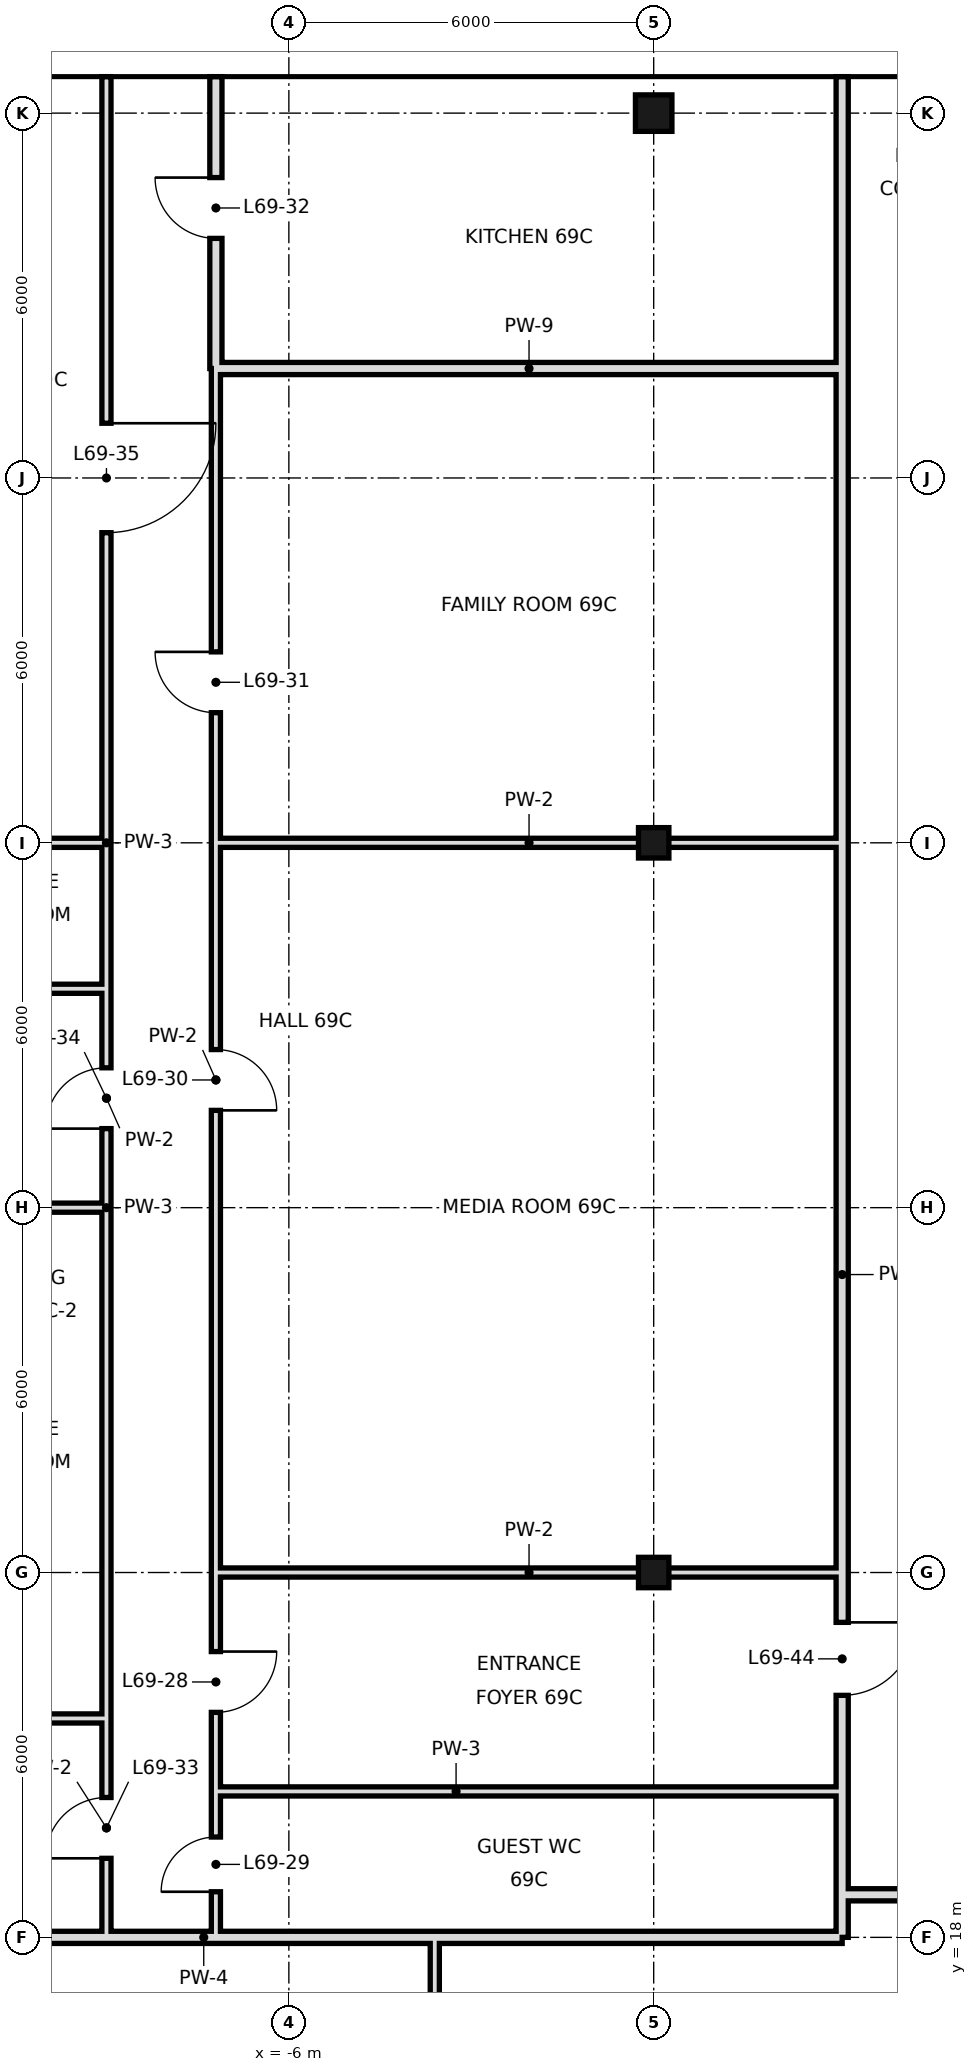
"""IFC4 building model, lengths in metres.
Left out: names, types, materials, properties, quantities, classifications, styles, units other than length and angle.
Written with IfcOpenShell. Run it as: python <this file> out.ifc"""

import sys

from ifc_helpers import new_model, si_unit, direction, frame, frame_2d, origin, origin_2d, place, context, subcontext, project, spatial, rectangle, hollow_rectangle, extrude, element, fill, save


model = new_model("IFC4")
c1 = context("Model", 3, precision=1e-05, world=origin(), true_north=direction((0.0, 1.0)))
c2 = subcontext(c1, "Body", "Model", "MODEL_VIEW")
j1 = project(units=[si_unit("LENGTHUNIT", "METRE"), si_unit("PLANEANGLEUNIT", "RADIAN")], contexts=[c1])
p1 = place(None, origin())
s1 = spatial("IfcSite", under=j1, at=p1, CompositionType="ELEMENT")
p2 = place(p1, origin())
s2 = spatial("IfcBuilding", under=s1, at=p2, CompositionType="ELEMENT")
p3 = place(p2, frame((0.0, 0.0, 294.4)))
s3 = spatial("IfcBuildingStorey", under=s2, at=p3, CompositionType="ELEMENT", Elevation=294.4)
for number, where, z_axis, x_axis in (
    (1, (0.0, 24.0, 0.0), (0.0, 0.0, 1.0), (1.0, 0.0, 0.0)),
    (2, (0.0, 36.0, 0.0), (0.0, 0.0, 1.0), (1.0, 0.0, 0.0)),
):
    element("IfcColumn", number, at=place(p3, frame(where, z_axis=z_axis, x_axis=x_axis)), inside=s3, PredefinedType="COLUMN", context=c2, shape_type="SweptSolid", body=[
        extrude(hollow_rectangle(XDim=0.5, YDim=0.5, WallThickness=0.025, at=origin_2d()), origin(), (0.0, 0.0, 1.0), 3.6),
    ])
p4 = place(p3, frame((0.0, 48.0, 0.0), z_axis=(0.0, 0.0, 1.0), x_axis=(1.0, 0.0, 0.0)))
e3 = element("IfcColumn", 3, at=p4, inside=s3, PredefinedType="COLUMN", context=c2, shape_type="SweptSolid", body=[
    extrude(hollow_rectangle(XDim=0.6, YDim=0.6, WallThickness=0.028, at=origin_2d()), origin(), (0.0, 0.0, 1.0), 3.6),
])
p5 = place(p3, frame((-3.6, 10.8, 0.0), z_axis=(0.0, 0.0, 1.0), x_axis=(0.0, 1.0, 0.0)))
e4 = element("IfcWall", 4, at=p5, inside=s3, PredefinedType="PARTITIONING", context=c2, shape_type="SweptSolid", body=[
    extrude(rectangle(XDim=7.2, YDim=0.15, at=frame_2d((3.6, 0.0))), origin(), (0.0, 0.0, 1.0), 3.42),
])
p6 = place(p3, frame((-7.2, 43.8, 0.0), z_axis=(0.0, 0.0, 1.0), x_axis=(0.0, 1.0, 0.0)))
e5 = element("IfcWall", 5, at=p6, inside=s3, PredefinedType="SOLIDWALL", context=c2, shape_type="SweptSolid", body=[
    extrude(rectangle(XDim=4.8, YDim=0.2, at=frame_2d((2.4, 0.0))), origin(), (0.0, 0.0, 1.0), 2.72),
])
p7 = place(p6, frame((2.14, 0.0, 0.0)))
e6 = element("IfcOpeningElement", 6, at=p7, cuts=e5, PredefinedType="OPENING", context=c2, shape_type="SweptSolid", body=[
    extrude(rectangle(XDim=1.0, YDim=2.4, at=frame_2d((0.5, 1.2))), frame((0.0, 0.11, 0.0), z_axis=(0.0, -1.0, 0.0), x_axis=(1.0, 0.0, 0.0)), (0.0, 0.0, 1.0), 0.22),
])
p8 = place(p3, frame((-7.2, 20.4, 0.0), z_axis=(0.0, 0.0, 1.0), x_axis=(0.0, 1.0, 0.0)))
e7 = element("IfcWall", 7, at=p8, inside=s3, PredefinedType="PARTITIONING", context=c2, shape_type="SweptSolid", body=[
    extrude(rectangle(XDim=23.4, YDim=0.15, at=frame_2d((11.7, 0.0))), origin(), (0.0, 0.0, 1.0), 3.42),
])
p9 = place(p8, frame((1.3, 0.0, 0.0)))
e8 = element("IfcOpeningElement", 8, at=p9, cuts=e7, PredefinedType="OPENING", context=c2, shape_type="SweptSolid", body=[
    extrude(rectangle(XDim=1.0, YDim=2.4, at=frame_2d((0.5, 1.2))), frame((0.0, 0.085, 0.0), z_axis=(0.0, -1.0, 0.0), x_axis=(1.0, 0.0, 0.0)), (0.0, 0.0, 1.0), 0.17),
])
p10 = place(p8, frame((11.2, 0.0, 0.0)))
e9 = element("IfcOpeningElement", 9, at=p10, cuts=e7, PredefinedType="OPENING", context=c2, shape_type="SweptSolid", body=[
    extrude(rectangle(XDim=1.0, YDim=2.4, at=frame_2d((0.5, 1.2))), frame((0.0, 0.085, 0.0), z_axis=(0.0, -1.0, 0.0), x_axis=(1.0, 0.0, 0.0)), (0.0, 0.0, 1.0), 0.17),
])
p11 = place(p8, frame((17.74, 0.0, 0.0)))
e10 = element("IfcOpeningElement", 10, at=p11, cuts=e7, PredefinedType="OPENING", context=c2, shape_type="SweptSolid", body=[
    extrude(rectangle(XDim=1.0, YDim=2.4, at=frame_2d((0.5, 1.2))), frame((0.0, 0.085, 0.0), z_axis=(0.0, -1.0, 0.0), x_axis=(1.0, 0.0, 0.0)), (0.0, 0.0, 1.0), 0.17),
])
p12 = place(p3, frame((-7.2, 18.0, 0.0), z_axis=(0.0, 0.0, 1.0), x_axis=(0.0, 1.0, 0.0)))
e11 = element("IfcWall", 11, at=p12, inside=s3, PredefinedType="PARTITIONING", context=c2, shape_type="SweptSolid", body=[
    extrude(rectangle(XDim=2.4, YDim=0.15, at=frame_2d((1.2, 0.0))), origin(), (0.0, 0.0, 1.0), 3.42),
])
p13 = place(p12, frame((0.75, 0.0, 0.0)))
e12 = element("IfcOpeningElement", 12, at=p13, cuts=e11, PredefinedType="OPENING", context=c2, shape_type="SweptSolid", body=[
    extrude(rectangle(XDim=0.9, YDim=2.4, at=frame_2d((0.45, 1.2))), frame((0.0, 0.085, 0.0), z_axis=(0.0, -1.0, 0.0), x_axis=(1.0, 0.0, 0.0)), (0.0, 0.0, 1.0), 0.17),
])
p14 = place(p3, frame((-9.0, 18.0, 0.0), z_axis=(0.0, 0.0, 1.0), x_axis=(0.0, 1.0, 0.0)))
e13 = element("IfcWall", 13, at=p14, inside=s3, PredefinedType="PARTITIONING", context=c2, shape_type="SweptSolid", body=[
    extrude(rectangle(XDim=3.6, YDim=0.15, at=frame_2d((1.8, 0.0))), origin(), (0.0, 0.0, 1.0), 3.42),
])
p15 = place(p14, frame((1.3, 0.0, 0.0)))
e14 = element("IfcOpeningElement", 14, at=p15, cuts=e13, PredefinedType="OPENING", context=c2, shape_type="SweptSolid", body=[
    extrude(rectangle(XDim=1.0, YDim=2.4, at=frame_2d((0.5, 1.2))), frame((0.0, 0.085, 0.0), z_axis=(0.0, -1.0, 0.0), x_axis=(1.0, 0.0, 0.0)), (0.0, 0.0, 1.0), 0.17),
])
p16 = place(p3, frame((-9.0, 30.0, 0.0), z_axis=(0.0, 0.0, 1.0), x_axis=(0.0, 1.0, 0.0)))
e15 = element("IfcWall", 15, at=p16, inside=s3, PredefinedType="PARTITIONING", context=c2, shape_type="SweptSolid", body=[
    extrude(rectangle(XDim=3.6, YDim=0.15, at=frame_2d((1.8, 0.0))), origin(), (0.0, 0.0, 1.0), 3.42),
])
p17 = place(p16, frame((1.3, 0.0, 0.0)))
e16 = element("IfcOpeningElement", 16, at=p17, cuts=e15, PredefinedType="OPENING", context=c2, shape_type="SweptSolid", body=[
    extrude(rectangle(XDim=1.0, YDim=2.4, at=frame_2d((0.5, 1.2))), frame((0.0, 0.085, 0.0), z_axis=(0.0, -1.0, 0.0), x_axis=(1.0, 0.0, 0.0)), (0.0, 0.0, 1.0), 0.17),
])
p18 = place(p3, frame((-9.0, 36.0, 0.0), z_axis=(0.0, 0.0, 1.0), x_axis=(0.0, 1.0, 0.0)))
e17 = element("IfcWall", 17, at=p18, inside=s3, PredefinedType="PARTITIONING", context=c2, shape_type="SweptSolid", body=[
    extrude(rectangle(XDim=12.6, YDim=0.15, at=frame_2d((6.3, 0.0))), origin(), (0.0, 0.0, 1.0), 3.42),
])
p19 = place(p18, frame((5.1, 0.0, 0.0)))
e18 = element("IfcOpeningElement", 18, at=p19, cuts=e17, PredefinedType="OPENING", context=c2, shape_type="SweptSolid", body=[
    extrude(rectangle(XDim=1.8, YDim=2.4, at=frame_2d((0.9, 1.2))), frame((0.0, 0.085, 0.0), z_axis=(0.0, -1.0, 0.0), x_axis=(1.0, 0.0, 0.0)), (0.0, 0.0, 1.0), 0.17),
])
p20 = place(p3, frame((-9.0, 21.6, 0.0), z_axis=(0.0, 0.0, 1.0), x_axis=(0.0, 1.0, 0.0)))
e19 = element("IfcWall", 19, at=p20, inside=s3, PredefinedType="PARTITIONING", context=c2, shape_type="SweptSolid", body=[
    extrude(rectangle(XDim=8.4, YDim=0.15, at=frame_2d((4.2, 0.0))), origin(), (0.0, 0.0, 1.0), 3.42),
])
p21 = place(p3, frame((-9.0, 33.6, 0.0), z_axis=(0.0, 0.0, 1.0), x_axis=(0.0, 1.0, 0.0)))
e20 = element("IfcWall", 20, at=p21, inside=s3, PredefinedType="PARTITIONING", context=c2, shape_type="SweptSolid", body=[
    extrude(rectangle(XDim=2.4, YDim=0.15, at=frame_2d((1.2, 0.0))), origin(), (0.0, 0.0, 1.0), 3.42),
])
p22 = place(p3, frame((3.1, 18.7, 0.0), z_axis=(0.0, 0.0, 1.0), x_axis=(0.0, 1.0, 0.0)))
e21 = element("IfcWall", 21, at=p22, inside=s3, PredefinedType="SOLIDWALL", context=c2, shape_type="SweptSolid", body=[
    extrude(rectangle(XDim=25.1, YDim=0.2, at=frame_2d((12.55, 0.0))), origin(), (0.0, 0.0, 1.0), 2.97),
])
p23 = place(p22, frame((3.28, 0.0, 0.0)))
e22 = element("IfcOpeningElement", 22, at=p23, cuts=e21, PredefinedType="OPENING", context=c2, shape_type="SweptSolid", body=[
    extrude(rectangle(XDim=1.2, YDim=2.4, at=frame_2d((0.6, 1.2))), frame((0.0, 0.11, 0.0), z_axis=(0.0, -1.0, 0.0), x_axis=(1.0, 0.0, 0.0)), (0.0, 0.0, 1.0), 0.22),
])
p24 = place(p3, frame((3.1, 43.8, 0.0), z_axis=(0.0, 0.0, 1.0), x_axis=(0.0, 1.0, 0.0)))
e23 = element("IfcWall", 23, at=p24, inside=s3, PredefinedType="SOLIDWALL", context=c2, shape_type="SweptSolid", body=[
    extrude(rectangle(XDim=4.8, YDim=0.2, at=frame_2d((2.4, 0.0))), origin(), (0.0, 0.0, 1.0), 2.72),
])
p25 = place(p3, frame((3.1, 18.0, 0.0), z_axis=(0.0, 0.0, 1.0), x_axis=(0.0, 1.0, 0.0)))
e24 = element("IfcWall", 24, at=p25, inside=s3, PredefinedType="SOLIDWALL", context=c2, shape_type="SweptSolid", body=[
    extrude(rectangle(XDim=0.7, YDim=0.2, at=frame_2d((0.35, 0.0))), origin(), (0.0, 0.0, 1.0), 2.97),
])
p26 = place(p3, frame((-18.6, 18.0, 0.0), z_axis=(0.0, 0.0, 1.0), x_axis=(1.0, 0.0, 0.0)))
e25 = element("IfcWall", 25, at=p26, inside=s3, PredefinedType="SOLIDWALL", context=c2, shape_type="SweptSolid", body=[
    extrude(rectangle(XDim=21.7, YDim=0.2, at=frame_2d((10.85, 0.0))), origin(), (0.0, 0.0, 1.0), 2.72),
])
p27 = place(p3, frame((3.1, 18.7, 0.0), z_axis=(0.0, 0.0, 1.0), x_axis=(1.0, 0.0, 0.0)))
e26 = element("IfcWall", 26, at=p27, inside=s3, PredefinedType="SOLIDWALL", context=c2, shape_type="SweptSolid", body=[
    extrude(rectangle(XDim=4.7, YDim=0.2, at=frame_2d((2.35, 0.0))), origin(), (0.0, 0.0, 1.0), 2.72),
])
p28 = place(p3, frame((-7.2, 20.4, 0.0), z_axis=(0.0, 0.0, 1.0), x_axis=(1.0, 0.0, 0.0)))
e27 = element("IfcWall", 27, at=p28, inside=s3, PredefinedType="PARTITIONING", context=c2, shape_type="SweptSolid", body=[
    extrude(rectangle(XDim=10.3, YDim=0.15, at=frame_2d((5.15, 0.0))), origin(), (0.0, 0.0, 1.0), 3.42),
])
p29 = place(p3, frame((-12.0, 21.6, 0.0), z_axis=(0.0, 0.0, 1.0), x_axis=(1.0, 0.0, 0.0)))
e28 = element("IfcWall", 28, at=p29, inside=s3, PredefinedType="PARTITIONING", context=c2, shape_type="SweptSolid", body=[
    extrude(rectangle(XDim=3.0, YDim=0.15, at=frame_2d((1.5, 0.0))), origin(), (0.0, 0.0, 1.0), 3.42),
])
p30 = place(p3, frame((-7.2, 24.0, 0.0), z_axis=(0.0, 0.0, 1.0), x_axis=(1.0, 0.0, 0.0)))
e29 = element("IfcWall", 29, at=p30, inside=s3, PredefinedType="PARTITIONING", context=c2, shape_type="SweptSolid", body=[
    extrude(rectangle(XDim=10.3, YDim=0.15, at=frame_2d((5.15, 0.0))), origin(), (0.0, 0.0, 1.0), 2.72),
])
p31 = place(p3, frame((-12.0, 30.0, 0.0), z_axis=(0.0, 0.0, 1.0), x_axis=(1.0, 0.0, 0.0)))
e30 = element("IfcWall", 30, at=p31, inside=s3, PredefinedType="PARTITIONING", context=c2, shape_type="SweptSolid", body=[
    extrude(rectangle(XDim=3.0, YDim=0.15, at=frame_2d((1.5, 0.0))), origin(), (0.0, 0.0, 1.0), 2.72),
])
p32 = place(p3, frame((-12.0, 33.6, 0.0), z_axis=(0.0, 0.0, 1.0), x_axis=(1.0, 0.0, 0.0)))
e31 = element("IfcWall", 31, at=p32, inside=s3, PredefinedType="PARTITIONING", context=c2, shape_type="SweptSolid", body=[
    extrude(rectangle(XDim=3.0, YDim=0.15, at=frame_2d((1.5, 0.0))), origin(), (0.0, 0.0, 1.0), 3.42),
])
p33 = place(p3, frame((-7.2, 36.0, 0.0), z_axis=(0.0, 0.0, 1.0), x_axis=(1.0, 0.0, 0.0)))
e32 = element("IfcWall", 32, at=p33, inside=s3, PredefinedType="PARTITIONING", context=c2, shape_type="SweptSolid", body=[
    extrude(rectangle(XDim=10.3, YDim=0.15, at=frame_2d((5.15, 0.0))), origin(), (0.0, 0.0, 1.0), 2.72),
])
p34 = place(p3, frame((-12.0, 36.0, 0.0), z_axis=(0.0, 0.0, 1.0), x_axis=(1.0, 0.0, 0.0)))
e33 = element("IfcWall", 33, at=p34, inside=s3, PredefinedType="PARTITIONING", context=c2, shape_type="SweptSolid", body=[
    extrude(rectangle(XDim=3.0, YDim=0.15, at=frame_2d((1.5, 0.0))), origin(), (0.0, 0.0, 1.0), 2.72),
])
p35 = place(p3, frame((-7.2, 43.8, 0.0), z_axis=(0.0, 0.0, 1.0), x_axis=(1.0, 0.0, 0.0)))
e34 = element("IfcWall", 34, at=p35, inside=s3, PredefinedType="SOLIDWALL", context=c2, shape_type="SweptSolid", body=[
    extrude(rectangle(XDim=10.3, YDim=0.2, at=frame_2d((5.15, 0.0))), origin(), (0.0, 0.0, 1.0), 2.72),
])
p36 = place(p9, origin())
e35 = element("IfcDoor", 35, at=p36, inside=s3, OperationType="SINGLE_SWING_RIGHT", PredefinedType="DOOR", context=c2, shape_type="SweptSolid", body=[
    extrude(rectangle(XDim=1.0, YDim=2.4, at=frame_2d((0.5, 1.2))), frame((0.0, 0.025, 0.0), z_axis=(0.0, -1.0, 0.0), x_axis=(1.0, 0.0, 0.0)), (0.0, 0.0, 1.0), 0.05),
])
fill(e8, e35)
p37 = place(p13, origin())
e36 = element("IfcDoor", 36, at=p37, inside=s3, OperationType="SINGLE_SWING_LEFT", PredefinedType="DOOR", context=c2, shape_type="SweptSolid", body=[
    extrude(rectangle(XDim=0.9, YDim=2.4, at=frame_2d((0.45, 1.2))), frame((0.0, 0.025, 0.0), z_axis=(0.0, -1.0, 0.0), x_axis=(1.0, 0.0, 0.0)), (0.0, 0.0, 1.0), 0.05),
])
fill(e12, e36)
p38 = place(p10, frame((1.0, 0.0, 0.0), z_axis=(0.0, 0.0, 1.0), x_axis=(-1.0, 0.0, 0.0)))
e37 = element("IfcDoor", 37, at=p38, inside=s3, OperationType="SINGLE_SWING_RIGHT", PredefinedType="DOOR", context=c2, shape_type="SweptSolid", body=[
    extrude(rectangle(XDim=1.0, YDim=2.4, at=frame_2d((0.5, 1.2))), frame((0.0, 0.025, 0.0), z_axis=(0.0, -1.0, 0.0), x_axis=(1.0, 0.0, 0.0)), (0.0, 0.0, 1.0), 0.05),
])
fill(e9, e37)
p39 = place(p11, frame((1.0, 0.0, 0.0), z_axis=(0.0, 0.0, 1.0), x_axis=(-1.0, 0.0, 0.0)))
e38 = element("IfcDoor", 38, at=p39, inside=s3, OperationType="SINGLE_SWING_LEFT", PredefinedType="DOOR", context=c2, shape_type="SweptSolid", body=[
    extrude(rectangle(XDim=1.0, YDim=2.4, at=frame_2d((0.5, 1.2))), frame((0.0, 0.025, 0.0), z_axis=(0.0, -1.0, 0.0), x_axis=(1.0, 0.0, 0.0)), (0.0, 0.0, 1.0), 0.05),
])
fill(e10, e38)
p40 = place(p7, frame((1.0, 0.0, 0.0), z_axis=(0.0, 0.0, 1.0), x_axis=(-1.0, 0.0, 0.0)))
e39 = element("IfcDoor", 39, at=p40, inside=s3, OperationType="SINGLE_SWING_LEFT", PredefinedType="DOOR", context=c2, shape_type="SweptSolid", body=[
    extrude(rectangle(XDim=1.0, YDim=2.4, at=frame_2d((0.5, 1.2))), frame((0.0, 0.025, 0.0), z_axis=(0.0, -1.0, 0.0), x_axis=(1.0, 0.0, 0.0)), (0.0, 0.0, 1.0), 0.05),
])
fill(e6, e39)
p41 = place(p15, origin())
e40 = element("IfcDoor", 40, at=p41, inside=s3, OperationType="SINGLE_SWING_LEFT", PredefinedType="DOOR", context=c2, shape_type="SweptSolid", body=[
    extrude(rectangle(XDim=1.0, YDim=2.4, at=frame_2d((0.5, 1.2))), frame((0.0, 0.025, 0.0), z_axis=(0.0, -1.0, 0.0), x_axis=(1.0, 0.0, 0.0)), (0.0, 0.0, 1.0), 0.05),
])
fill(e14, e40)
p42 = place(p17, origin())
e41 = element("IfcDoor", 41, at=p42, inside=s3, OperationType="SINGLE_SWING_LEFT", PredefinedType="DOOR", context=c2, shape_type="SweptSolid", body=[
    extrude(rectangle(XDim=1.0, YDim=2.4, at=frame_2d((0.5, 1.2))), frame((0.0, 0.025, 0.0), z_axis=(0.0, -1.0, 0.0), x_axis=(1.0, 0.0, 0.0)), (0.0, 0.0, 1.0), 0.05),
])
fill(e16, e41)
p43 = place(p19, origin())
e42 = element("IfcDoor", 42, at=p43, inside=s3, OperationType="SINGLE_SWING_RIGHT", PredefinedType="DOOR", context=c2, shape_type="SweptSolid", body=[
    extrude(rectangle(XDim=1.8, YDim=2.4, at=frame_2d((0.9, 1.2))), frame((0.0, 0.025, 0.0), z_axis=(0.0, -1.0, 0.0), x_axis=(1.0, 0.0, 0.0)), (0.0, 0.0, 1.0), 0.05),
])
fill(e18, e42)
p44 = place(p23, origin())
e43 = element("IfcDoor", 43, at=p44, inside=s3, OperationType="SINGLE_SWING_RIGHT", PredefinedType="DOOR", context=c2, shape_type="SweptSolid", body=[
    extrude(rectangle(XDim=1.2, YDim=2.4, at=frame_2d((0.6, 1.2))), frame((0.0, 0.025, 0.0), z_axis=(0.0, -1.0, 0.0), x_axis=(1.0, 0.0, 0.0)), (0.0, 0.0, 1.0), 0.05),
])
fill(e22, e43)
save(model, sys.argv[1])
